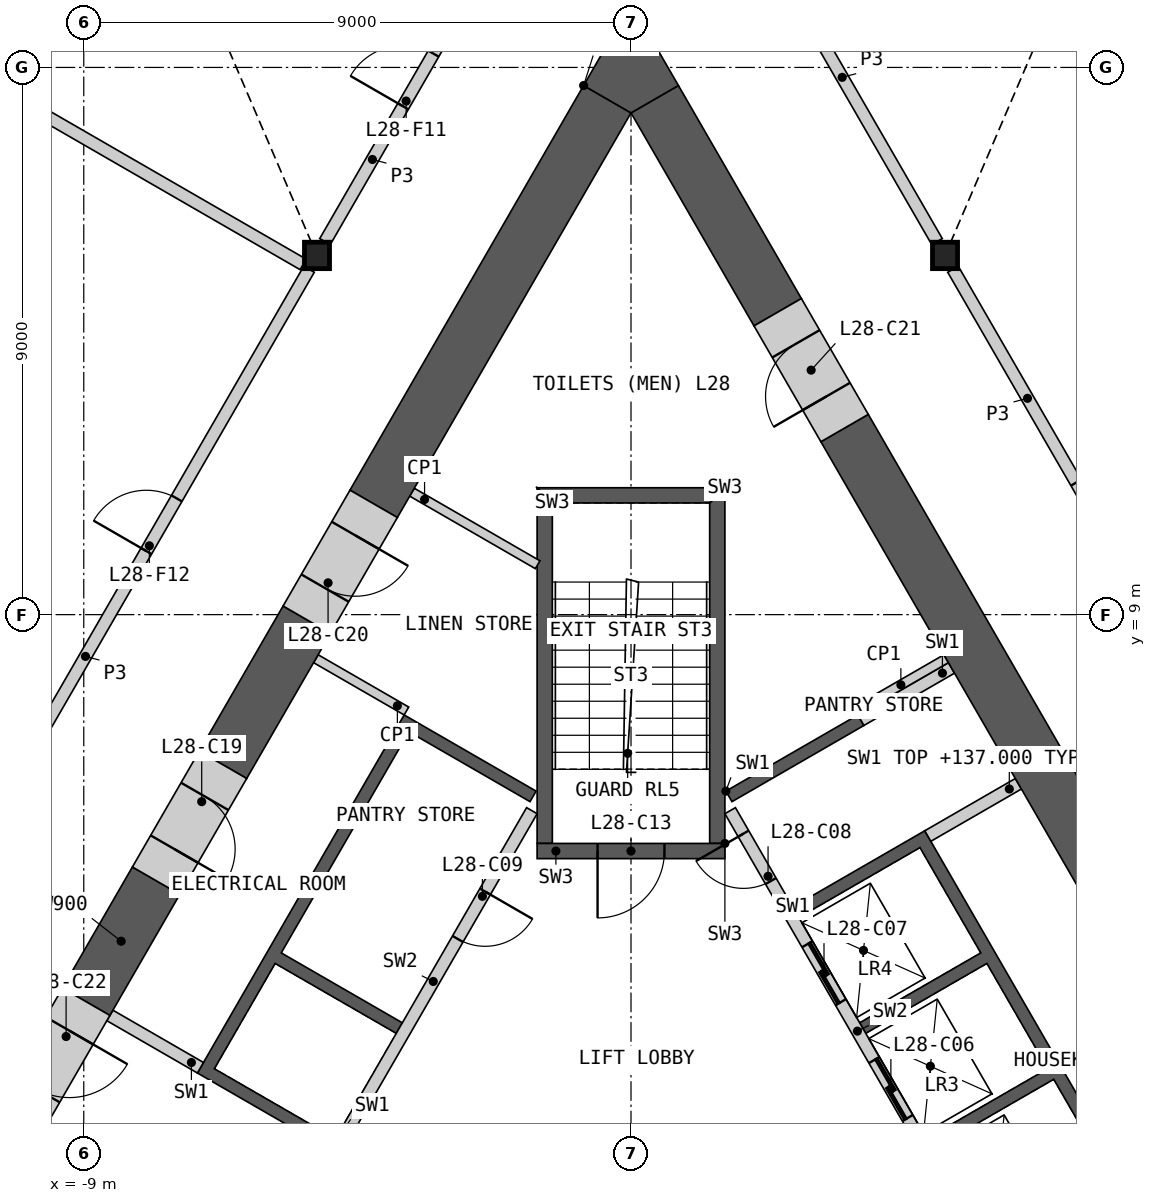
"""IFC4 building model, lengths in metres.
Left out: names, types, materials, properties, quantities, classifications, styles, units other than length and angle.
Written with IfcOpenShell. Run it as: python <this file> out.ifc"""

import sys

from ifc_helpers import new_model, si_unit, direction, frame, frame_2d, origin, origin_2d, place, context, subcontext, project, spatial, polyline, rectangle, i_section, outline, extrude, element, fill, save


model = new_model("IFC4")
c1 = context("Model", 3, precision=1e-05, world=origin(), true_north=direction((0.0, 1.0)))
c2 = subcontext(c1, "Body", "Model", "MODEL_VIEW")
j1 = project(units=[si_unit("LENGTHUNIT", "METRE"), si_unit("PLANEANGLEUNIT", "RADIAN")], contexts=[c1])
p1 = place(None, origin())
s1 = spatial("IfcSite", under=j1, at=p1, CompositionType="ELEMENT")
p2 = place(p1, origin())
s2 = spatial("IfcBuilding", under=s1, at=p2, CompositionType="ELEMENT")
p3 = place(p2, frame((0.0, 0.0, 133.2)))
s3 = spatial("IfcBuildingStorey", under=s2, at=p3, CompositionType="ELEMENT", Elevation=133.2)
for number, where, z_axis, x_axis in (
    (1, (-5.164, 14.908, 0.0), (0.0, 0.0, 1.0), (1.0, 0.0, 0.0)),
    (2, (5.164, 14.908, 0.0), (0.0, 0.0, 1.0), (1.0, 0.0, 0.0)),
):
    element("IfcColumn", number, at=place(p3, frame(where, z_axis=z_axis, x_axis=x_axis)), inside=s3, PredefinedType="COLUMN", context=c2, shape_type="SweptSolid", body=[
        extrude(i_section(OverallWidth=0.412, OverallDepth=0.435, WebThickness=0.036, FlangeThickness=0.057, at=origin_2d()), origin(), (0.0, 0.0, 1.0), 4.2),
    ])
p4 = place(p3, origin())
e3 = element("IfcWall", 3, at=p4, inside=s3, PredefinedType="SHEAR", context=c2, shape_type="SweptSolid", body=[
    extrude(outline(polyline([(1.561, 6.097), (3.731, 7.35), (3.831, 7.177), (1.66, 5.924), (1.561, 6.097)])), origin(), (0.0, 0.0, 1.0), 3.8),
])
p5 = place(p3, origin())
e4 = element("IfcWall", 4, at=p5, inside=s3, PredefinedType="SHEAR", context=c2, shape_type="SweptSolid", body=[
    extrude(outline(polyline([(2.66, 4.192), (4.831, 5.445), (8.231, -0.444), (6.061, -1.697), (5.96, -1.524), (7.952, -0.374), (6.952, 1.358), (4.96, 0.208), (4.861, 0.381), (6.852, 1.531), (5.852, 3.263), (3.861, 2.113), (3.76, 2.287), (5.752, 3.437), (4.752, 5.169), (2.76, 4.019), (2.66, 4.192)])), origin(), (0.0, 0.0, 1.0), 3.8),
])
p6 = place(p3, frame((5.817, -1.476, 0.0), z_axis=(0.0, 0.0, 1.0), x_axis=(-0.500002616675, 0.866023893041, 0.0)))
e5 = element("IfcWall", 5, at=p6, inside=s3, PredefinedType="SOLIDWALL", context=c2, shape_type="SweptSolid", body=[
    extrude(rectangle(XDim=8.373, YDim=0.2, at=frame_2d((4.187, 0.0))), origin(), (0.0, 0.0, 1.0), 3.8),
])
p7 = place(p6, frame((0.337, 0.0, 0.0)))
e6 = element("IfcOpeningElement", 6, at=p7, cuts=e5, PredefinedType="OPENING", context=c2, shape_type="SweptSolid", body=[
    extrude(rectangle(XDim=1.1, YDim=2.1, at=frame_2d((0.55, 1.05))), frame((0.0, 0.11, 0.0), z_axis=(0.0, -1.0, 0.0), x_axis=(1.0, 0.0, 0.0)), (0.0, 0.0, 1.0), 0.22),
])
p8 = place(p6, frame((2.537, 0.0, 0.0)))
e7 = element("IfcOpeningElement", 7, at=p8, cuts=e5, PredefinedType="OPENING", context=c2, shape_type="SweptSolid", body=[
    extrude(rectangle(XDim=1.1, YDim=2.1, at=frame_2d((0.55, 1.05))), frame((0.0, 0.11, 0.0), z_axis=(0.0, -1.0, 0.0), x_axis=(1.0, 0.0, 0.0)), (0.0, 0.0, 1.0), 0.22),
])
p9 = place(p6, frame((4.737, 0.0, 0.0)))
e8 = element("IfcOpeningElement", 8, at=p9, cuts=e5, PredefinedType="OPENING", context=c2, shape_type="SweptSolid", body=[
    extrude(rectangle(XDim=1.1, YDim=2.1, at=frame_2d((0.55, 1.05))), frame((0.0, 0.11, 0.0), z_axis=(0.0, -1.0, 0.0), x_axis=(1.0, 0.0, 0.0)), (0.0, 0.0, 1.0), 0.22),
])
p10 = place(p6, frame((7.037, 0.0, 0.0)))
e9 = element("IfcOpeningElement", 9, at=p10, cuts=e5, PredefinedType="OPENING", context=c2, shape_type="SweptSolid", body=[
    extrude(rectangle(XDim=0.9, YDim=2.1, at=frame_2d((0.45, 1.05))), frame((0.0, 0.11, 0.0), z_axis=(0.0, -1.0, 0.0), x_axis=(1.0, 0.0, 0.0)), (0.0, 0.0, 1.0), 0.22),
])
for number, where, z_axis, x_axis in (
    (10, (4.881, 5.358, 0.0), (0.0, 0.0, 1.0), (0.866, 0.5, 0.0)),
    (11, (3.781, 7.263, 0.0), (0.0, 0.0, 1.0), (0.866, 0.5, 0.0)),
):
    element("IfcWall", number, at=place(p3, frame(where, z_axis=z_axis, x_axis=x_axis)), inside=s3, PredefinedType="SHEAR", context=c2, shape_type="SweptSolid", body=[
        extrude(rectangle(XDim=1.72, YDim=0.2, at=frame_2d((0.86, 0.0))), origin(), (0.0, 0.0, 1.0), 3.8),
    ])
p11 = place(p3, origin())
e12 = element("IfcWall", 12, at=p11, inside=s3, PredefinedType="SHEAR", context=c2, shape_type="SweptSolid", body=[
    extrude(outline(polyline([(-4.96, 0.208), (-7.131, 1.461), (-3.731, 7.35), (-1.561, 6.097), (-1.66, 5.924), (-3.652, 7.074), (-5.752, 3.437), (-3.76, 2.287), (-3.861, 2.113), (-5.852, 3.263), (-6.852, 1.531), (-4.861, 0.381), (-4.96, 0.208)])), origin(), (0.0, 0.0, 1.0), 3.8),
])
p12 = place(p3, frame((-1.631, 5.776, 0.0), z_axis=(0.0, 0.0, 1.0), x_axis=(-0.499992876559, -0.866029516466, 0.0)))
e13 = element("IfcWall", 13, at=p12, inside=s3, PredefinedType="SOLIDWALL", context=c2, shape_type="SweptSolid", body=[
    extrude(rectangle(XDim=6.486, YDim=0.2, at=frame_2d((3.243, 0.0))), origin(), (0.0, 0.0, 1.0), 3.8),
])
p13 = place(p12, frame((1.537, 0.0, 0.0)))
e14 = element("IfcOpeningElement", 14, at=p13, cuts=e13, PredefinedType="OPENING", context=c2, shape_type="SweptSolid", body=[
    extrude(rectangle(XDim=0.9, YDim=2.1, at=frame_2d((0.45, 1.05))), frame((0.0, 0.11, 0.0), z_axis=(0.0, -1.0, 0.0), x_axis=(1.0, 0.0, 0.0)), (0.0, 0.0, 1.0), 0.22),
])
p14 = place(p3, frame((-7.081, 1.548, 0.0), z_axis=(0.0, 0.0, 1.0), x_axis=(-0.865963414263, 0.500107353632, 0.0)))
e15 = element("IfcWall", 15, at=p14, inside=s3, PredefinedType="SHEAR", context=c2, shape_type="SweptSolid", body=[
    extrude(rectangle(XDim=1.72, YDim=0.2, at=frame_2d((0.86, 0.0))), origin(), (0.0, 0.0, 1.0), 3.8),
])
p15 = place(p3, origin())
e16 = element("IfcWall", 16, at=p15, inside=s3, PredefinedType="SHEAR", context=c2, shape_type="SweptSolid", body=[
    extrude(outline(polyline([(1.544, 5.237), (1.544, 11.087), (1.294, 10.837), (1.294, 5.237), (1.544, 5.237)])), origin(), (0.0, 0.0, 1.0), 3.8),
])
p16 = place(p3, origin())
e17 = element("IfcWall", 17, at=p16, inside=s3, PredefinedType="SHEAR", context=c2, shape_type="SweptSolid", body=[
    extrude(outline(polyline([(1.544, 11.087), (-1.544, 11.087), (-1.294, 10.837), (1.294, 10.837), (1.544, 11.087)])), origin(), (0.0, 0.0, 1.0), 3.8),
])
p17 = place(p3, origin())
e18 = element("IfcWall", 18, at=p17, inside=s3, PredefinedType="SHEAR", context=c2, shape_type="SweptSolid", body=[
    extrude(outline(polyline([(-1.294, 10.837), (-1.544, 11.087), (-1.544, 5.237), (-1.294, 5.237), (-1.294, 10.837)])), origin(), (0.0, 0.0, 1.0), 3.8),
])
p18 = place(p3, frame((1.544, 5.112, 0.0), z_axis=(0.0, 0.0, 1.0), x_axis=(-1.0, 0.0, 0.0)))
e19 = element("IfcWall", 19, at=p18, inside=s3, PredefinedType="SHEAR", context=c2, shape_type="SweptSolid", body=[
    extrude(rectangle(XDim=3.088, YDim=0.25, at=frame_2d((1.544, 0.0))), origin(), (0.0, 0.0, 1.0), 3.8),
])
p19 = place(p18, frame((0.994, 0.0, 0.0)))
e20 = element("IfcOpeningElement", 20, at=p19, cuts=e19, PredefinedType="OPENING", context=c2, shape_type="SweptSolid", body=[
    extrude(rectangle(XDim=1.1, YDim=2.1, at=frame_2d((0.55, 1.05))), frame((0.0, 0.135, 0.0), z_axis=(0.0, -1.0, 0.0), x_axis=(1.0, 0.0, 0.0)), (0.0, 0.0, 1.0), 0.27),
])
for number, where, z_axis, x_axis in (
    (21, (3.693, 7.415, 0.0), (0.0, 0.0, 1.0), (0.866, 0.5, 0.0)),
    (22, (-3.693, 7.415, 0.0), (0.0, 0.0, 1.0), (-0.866, 0.5, 0.0)),
):
    element("IfcWall", number, at=place(p3, frame(where, z_axis=z_axis, x_axis=x_axis)), inside=s3, PredefinedType="PARTITIONING", context=c2, shape_type="SweptSolid", body=[
        extrude(rectangle(XDim=1.72, YDim=0.15, at=frame_2d((0.86, 0.0))), origin(), (0.0, 0.0, 1.0), 3.8),
    ])
p20 = place(p3, frame((-3.602, 11.014, 0.0), z_axis=(0.0, 0.0, 1.0), x_axis=(0.866011787705, -0.500023583, 0.0)))
e23 = element("IfcWall", 23, at=p20, inside=s3, PredefinedType="PARTITIONING", context=c2, shape_type="SweptSolid", body=[
    extrude(rectangle(XDim=2.386, YDim=0.15, at=frame_2d((1.193, 0.0))), origin(), (0.0, 0.0, 1.0), 3.8),
])
p21 = place(p3, frame((7.91, 4.451, 0.0), z_axis=(0.0, 0.0, 1.0), x_axis=(-0.500001962043, 0.866024270995, 0.0)))
e24 = element("IfcWall", 24, at=p21, inside=s3, PredefinedType="SHEAR", context=c2, shape_type="SweptSolid", body=[
    extrude(rectangle(XDim=8.796, YDim=0.9, at=frame_2d((4.398, 0.0))), origin(), (0.0, 0.0, 1.0), 3.8),
])
p22 = place(p3, frame((2.413, 13.974, 0.0), z_axis=(0.0, 0.0, 1.0), x_axis=(-0.500046330384, 0.865998653272, 0.0)))
e25 = element("IfcWall", 25, at=p22, inside=s3, PredefinedType="SHEAR", context=c2, shape_type="SweptSolid", body=[
    extrude(rectangle(XDim=4.045, YDim=0.9, at=frame_2d((2.023, 0.0))), origin(), (0.0, 0.0, 1.0), 3.8),
])
p23 = place(p3, frame((-0.39, 17.478, 0.0), z_axis=(0.0, 0.0, 1.0), x_axis=(-0.500010285023, -0.866019465642, 0.0)))
e26 = element("IfcWall", 26, at=p23, inside=s3, PredefinedType="SHEAR", context=c2, shape_type="SweptSolid", body=[
    extrude(rectangle(XDim=7.685, YDim=0.9, at=frame_2d((3.842, 0.0))), origin(), (0.0, 0.0, 1.0), 3.8),
])
p24 = place(p3, frame((-5.332, 8.917, 0.0), z_axis=(0.0, 0.0, 1.0), x_axis=(-0.499949934511, -0.866054307178, 0.0)))
e27 = element("IfcWall", 27, at=p24, inside=s3, PredefinedType="SHEAR", context=c2, shape_type="SweptSolid", body=[
    extrude(rectangle(XDim=2.756, YDim=0.9, at=frame_2d((1.378, 0.0))), origin(), (0.0, 0.0, 1.0), 3.8),
])
p25 = place(p3, frame((-7.81, 4.625, 0.0), z_axis=(0.0, 0.0, 1.0), x_axis=(-0.499952165731, -0.866053019151, 0.0)))
e28 = element("IfcWall", 28, at=p25, inside=s3, PredefinedType="SHEAR", context=c2, shape_type="SweptSolid", body=[
    extrude(rectangle(XDim=2.3, YDim=0.9, at=frame_2d((1.15, 0.0))), origin(), (0.0, 0.0, 1.0), 3.8),
])
p26 = place(p3, origin())
e29 = element("IfcWall", 29, at=p26, inside=s3, PredefinedType="SHEAR", context=c2, shape_type="SweptSolid", body=[
    extrude(outline(polyline([(-0.779, 17.703), (0.0, 19.052), (0.779, 17.703), (0.0, 17.253), (-0.779, 17.703)])), origin(), (0.0, 0.0, 1.0), 3.8),
])
p27 = place(p3, frame((-6.71, 6.53, 0.0), z_axis=(0.0, 0.0, 1.0), x_axis=(-0.50002983664, -0.866008176907, 0.0)))
e30 = element("IfcWall", 30, at=p27, inside=s3, PredefinedType="SHEAR", context=c2, shape_type="SweptSolid", body=[
    extrude(rectangle(XDim=2.2, YDim=0.9, at=frame_2d((1.1, 0.0))), origin(), (0.0, 0.0, 1.0), 3.8),
])
p28 = place(p27, frame((0.6, 0.0, 0.0)))
e31 = element("IfcOpeningElement", 31, at=p28, cuts=e30, PredefinedType="OPENING", context=c2, shape_type="SweptSolid", body=[
    extrude(rectangle(XDim=1.0, YDim=2.1, at=frame_2d((0.5, 1.05))), frame((0.0, 0.46, 0.0), z_axis=(0.0, -1.0, 0.0), x_axis=(1.0, 0.0, 0.0)), (0.0, 0.0, 1.0), 0.92),
])
p29 = place(p3, frame((-4.232, 10.822, 0.0), z_axis=(0.0, 0.0, 1.0), x_axis=(-0.50002983664, -0.866008176907, 0.0)))
e32 = element("IfcWall", 32, at=p29, inside=s3, PredefinedType="SHEAR", context=c2, shape_type="SweptSolid", body=[
    extrude(rectangle(XDim=2.2, YDim=0.9, at=frame_2d((1.1, 0.0))), origin(), (0.0, 0.0, 1.0), 3.8),
])
p30 = place(p29, frame((0.6, 0.0, 0.0)))
e33 = element("IfcOpeningElement", 33, at=p30, cuts=e32, PredefinedType="OPENING", context=c2, shape_type="SweptSolid", body=[
    extrude(rectangle(XDim=1.0, YDim=2.1, at=frame_2d((0.5, 1.05))), frame((0.0, 0.46, 0.0), z_axis=(0.0, -1.0, 0.0), x_axis=(1.0, 0.0, 0.0)), (0.0, 0.0, 1.0), 0.92),
])
p31 = place(p3, frame((3.512, 12.069, 0.0), z_axis=(0.0, 0.0, 1.0), x_axis=(-0.499946605688, 0.86605622881, 0.0)))
e34 = element("IfcWall", 34, at=p31, inside=s3, PredefinedType="SHEAR", context=c2, shape_type="SweptSolid", body=[
    extrude(rectangle(XDim=2.2, YDim=0.9, at=frame_2d((1.1, 0.0))), origin(), (0.0, 0.0, 1.0), 3.8),
])
p32 = place(p31, frame((0.6, 0.0, 0.0)))
e35 = element("IfcOpeningElement", 35, at=p32, cuts=e34, PredefinedType="OPENING", context=c2, shape_type="SweptSolid", body=[
    extrude(rectangle(XDim=1.0, YDim=2.1, at=frame_2d((0.5, 1.05))), frame((0.0, 0.46, 0.0), z_axis=(0.0, -1.0, 0.0), x_axis=(1.0, 0.0, 0.0)), (0.0, 0.0, 1.0), 0.92),
])
p33 = place(p3, frame((-8.96, 2.633, 0.0), z_axis=(0.0, 0.0, 1.0), x_axis=(-0.50002983664, -0.866008176907, 0.0)))
e36 = element("IfcWall", 36, at=p33, inside=s3, PredefinedType="SHEAR", context=c2, shape_type="SweptSolid", body=[
    extrude(rectangle(XDim=2.2, YDim=0.9, at=frame_2d((1.1, 0.0))), origin(), (0.0, 0.0, 1.0), 3.8),
])
p34 = place(p33, frame((0.55, 0.0, 0.0)))
e37 = element("IfcOpeningElement", 37, at=p34, cuts=e36, PredefinedType="OPENING", context=c2, shape_type="SweptSolid", body=[
    extrude(rectangle(XDim=1.1, YDim=2.1, at=frame_2d((0.55, 1.05))), frame((0.0, 0.46, 0.0), z_axis=(0.0, -1.0, 0.0), x_axis=(1.0, 0.0, 0.0)), (0.0, 0.0, 1.0), 0.92),
])
p35 = place(p3, frame((5.295, 14.68, 0.0), z_axis=(0.0, 0.0, 1.0), x_axis=(0.500012035596, -0.866018454918, 0.0)))
e38 = element("IfcWall", 38, at=p35, inside=s3, PredefinedType="PARTITIONING", context=c2, shape_type="SweptSolid", body=[
    extrude(rectangle(XDim=9.803, YDim=0.2, at=frame_2d((4.902, 0.0))), origin(), (0.0, 0.0, 1.0), 3.8),
])
p36 = place(p35, frame((4.052, 0.0, 0.0)))
e39 = element("IfcOpeningElement", 39, at=p36, cuts=e38, PredefinedType="OPENING", context=c2, shape_type="SweptSolid", body=[
    extrude(rectangle(XDim=1.8, YDim=2.1, at=frame_2d((0.9, 1.05))), frame((0.0, 0.11, 0.0), z_axis=(0.0, -1.0, 0.0), x_axis=(1.0, 0.0, 0.0)), (0.0, 0.0, 1.0), 0.22),
])
p37 = place(p3, frame((-10.197, 6.19, 0.0), z_axis=(0.0, 0.0, 1.0), x_axis=(0.500012035596, 0.866018454918, 0.0)))
e40 = element("IfcWall", 40, at=p37, inside=s3, PredefinedType="PARTITIONING", context=c2, shape_type="SweptSolid", body=[
    extrude(rectangle(XDim=9.803, YDim=0.2, at=frame_2d((4.902, 0.0))), origin(), (0.0, 0.0, 1.0), 3.8),
])
p38 = place(p37, frame((4.452, 0.0, 0.0)))
e41 = element("IfcOpeningElement", 41, at=p38, cuts=e40, PredefinedType="OPENING", context=c2, shape_type="SweptSolid", body=[
    extrude(rectangle(XDim=1.0, YDim=2.1, at=frame_2d((0.5, 1.05))), frame((0.0, 0.11, 0.0), z_axis=(0.0, -1.0, 0.0), x_axis=(1.0, 0.0, 0.0)), (0.0, 0.0, 1.0), 0.22),
])
p39 = place(p3, frame((-5.033, 15.135, 0.0), z_axis=(0.0, 0.0, 1.0), x_axis=(0.499980978912, 0.866036385336, 0.0)))
e42 = element("IfcWall", 42, at=p39, inside=s3, PredefinedType="PARTITIONING", context=c2, shape_type="SweptSolid", body=[
    extrude(rectangle(XDim=6.24, YDim=0.2, at=frame_2d((3.12, 0.0))), origin(), (0.0, 0.0, 1.0), 3.8),
])
p40 = place(p39, frame((2.57, 0.0, 0.0)))
e43 = element("IfcOpeningElement", 43, at=p40, cuts=e42, PredefinedType="OPENING", context=c2, shape_type="SweptSolid", body=[
    extrude(rectangle(XDim=1.0, YDim=2.1, at=frame_2d((0.5, 1.05))), frame((0.0, 0.11, 0.0), z_axis=(0.0, -1.0, 0.0), x_axis=(1.0, 0.0, 0.0)), (0.0, 0.0, 1.0), 0.22),
])
p41 = place(p3, frame((1.913, 20.539, 0.0), z_axis=(0.0, 0.0, 1.0), x_axis=(0.499980978912, -0.866036385336, 0.0)))
e44 = element("IfcWall", 44, at=p41, inside=s3, PredefinedType="PARTITIONING", context=c2, shape_type="SweptSolid", body=[
    extrude(rectangle(XDim=6.24, YDim=0.2, at=frame_2d((3.12, 0.0))), origin(), (0.0, 0.0, 1.0), 3.8),
])
p42 = place(p3, frame((-16.436, 21.137, 0.0), z_axis=(0.0, 0.0, 1.0), x_axis=(0.866023321739, -0.500003606191, 0.0)))
e45 = element("IfcWall", 45, at=p42, inside=s3, PredefinedType="PARTITIONING", context=c2, shape_type="SweptSolid", body=[
    extrude(rectangle(XDim=12.753, YDim=0.2, at=frame_2d((6.377, 0.0))), origin(), (0.0, 0.0, 1.0), 2.885),
])
p43 = place(p8, origin())
e46 = element("IfcDoor", 46, at=p43, inside=s3, OperationType="SLIDING_TO_LEFT", PredefinedType="DOOR", context=c2, shape_type="SweptSolid", body=[
    extrude(rectangle(XDim=1.1, YDim=2.1, at=frame_2d((0.55, 1.05))), frame((0.0, 0.025, 0.0), z_axis=(0.0, -1.0, 0.0), x_axis=(1.0, 0.0, 0.0)), (0.0, 0.0, 1.0), 0.05),
])
fill(e7, e46)
p44 = place(p9, origin())
e47 = element("IfcDoor", 47, at=p44, inside=s3, OperationType="SLIDING_TO_LEFT", PredefinedType="DOOR", context=c2, shape_type="SweptSolid", body=[
    extrude(rectangle(XDim=1.1, YDim=2.1, at=frame_2d((0.55, 1.05))), frame((0.0, 0.025, 0.0), z_axis=(0.0, -1.0, 0.0), x_axis=(1.0, 0.0, 0.0)), (0.0, 0.0, 1.0), 0.05),
])
fill(e8, e47)
p45 = place(p10, origin())
e48 = element("IfcDoor", 48, at=p45, inside=s3, OperationType="SINGLE_SWING_RIGHT", PredefinedType="DOOR", context=c2, shape_type="SweptSolid", body=[
    extrude(rectangle(XDim=0.9, YDim=2.1, at=frame_2d((0.45, 1.05))), frame((0.0, 0.025, 0.0), z_axis=(0.0, -1.0, 0.0), x_axis=(1.0, 0.0, 0.0)), (0.0, 0.0, 1.0), 0.05),
])
fill(e9, e48)
p46 = place(p13, origin())
e49 = element("IfcDoor", 49, at=p46, inside=s3, OperationType="SINGLE_SWING_LEFT", PredefinedType="DOOR", context=c2, shape_type="SweptSolid", body=[
    extrude(rectangle(XDim=0.9, YDim=2.1, at=frame_2d((0.45, 1.05))), frame((0.0, 0.025, 0.0), z_axis=(0.0, -1.0, 0.0), x_axis=(1.0, 0.0, 0.0)), (0.0, 0.0, 1.0), 0.05),
])
fill(e14, e49)
p47 = place(p19, origin())
e50 = element("IfcDoor", 50, at=p47, inside=s3, OperationType="SINGLE_SWING_RIGHT", PredefinedType="DOOR", context=c2, shape_type="SweptSolid", body=[
    extrude(rectangle(XDim=1.1, YDim=2.1, at=frame_2d((0.55, 1.05))), frame((0.0, 0.025, 0.0), z_axis=(0.0, -1.0, 0.0), x_axis=(1.0, 0.0, 0.0)), (0.0, 0.0, 1.0), 0.05),
])
fill(e20, e50)
p48 = place(p28, origin())
e51 = element("IfcDoor", 51, at=p48, inside=s3, OperationType="SINGLE_SWING_RIGHT", PredefinedType="DOOR", context=c2, shape_type="SweptSolid", body=[
    extrude(rectangle(XDim=1.0, YDim=2.1, at=frame_2d((0.5, 1.05))), frame((0.0, 0.205, 0.0), z_axis=(0.0, -1.0, 0.0), x_axis=(1.0, 0.0, 0.0)), (0.0, 0.0, 1.0), 0.05),
])
fill(e31, e51)
p49 = place(p30, origin())
e52 = element("IfcDoor", 52, at=p49, inside=s3, OperationType="SINGLE_SWING_LEFT", PredefinedType="DOOR", context=c2, shape_type="SweptSolid", body=[
    extrude(rectangle(XDim=1.0, YDim=2.1, at=frame_2d((0.5, 1.05))), frame((0.0, 0.205, 0.0), z_axis=(0.0, -1.0, 0.0), x_axis=(1.0, 0.0, 0.0)), (0.0, 0.0, 1.0), 0.05),
])
fill(e33, e52)
p50 = place(p32, origin())
e53 = element("IfcDoor", 53, at=p50, inside=s3, OperationType="SINGLE_SWING_LEFT", PredefinedType="DOOR", context=c2, shape_type="SweptSolid", body=[
    extrude(rectangle(XDim=1.0, YDim=2.1, at=frame_2d((0.5, 1.05))), frame((0.0, 0.205, 0.0), z_axis=(0.0, -1.0, 0.0), x_axis=(1.0, 0.0, 0.0)), (0.0, 0.0, 1.0), 0.05),
])
fill(e35, e53)
p51 = place(p34, origin())
e54 = element("IfcDoor", 54, at=p51, inside=s3, OperationType="SINGLE_SWING_LEFT", PredefinedType="DOOR", context=c2, shape_type="SweptSolid", body=[
    extrude(rectangle(XDim=1.1, YDim=2.1, at=frame_2d((0.55, 1.05))), frame((0.0, 0.205, 0.0), z_axis=(0.0, -1.0, 0.0), x_axis=(1.0, 0.0, 0.0)), (0.0, 0.0, 1.0), 0.05),
])
fill(e37, e54)
p52 = place(p36, origin())
e55 = element("IfcDoor", 55, at=p52, inside=s3, OperationType="DOUBLE_DOOR_SINGLE_SWING", PredefinedType="DOOR", context=c2, shape_type="SweptSolid", body=[
    extrude(rectangle(XDim=1.8, YDim=2.1, at=frame_2d((0.9, 1.05))), frame((0.0, 0.025, 0.0), z_axis=(0.0, -1.0, 0.0), x_axis=(1.0, 0.0, 0.0)), (0.0, 0.0, 1.0), 0.05),
])
fill(e39, e55)
p53 = place(p40, origin())
e56 = element("IfcDoor", 56, at=p53, inside=s3, OperationType="SINGLE_SWING_LEFT", PredefinedType="DOOR", context=c2, shape_type="SweptSolid", body=[
    extrude(rectangle(XDim=1.0, YDim=2.1, at=frame_2d((0.5, 1.05))), frame((0.0, 0.025, 0.0), z_axis=(0.0, -1.0, 0.0), x_axis=(1.0, 0.0, 0.0)), (0.0, 0.0, 1.0), 0.05),
])
fill(e43, e56)
p54 = place(p38, origin())
e57 = element("IfcDoor", 57, at=p54, inside=s3, OperationType="SINGLE_SWING_LEFT", PredefinedType="DOOR", context=c2, shape_type="SweptSolid", body=[
    extrude(rectangle(XDim=1.0, YDim=2.1, at=frame_2d((0.5, 1.05))), frame((0.0, 0.025, 0.0), z_axis=(0.0, -1.0, 0.0), x_axis=(1.0, 0.0, 0.0)), (0.0, 0.0, 1.0), 0.05),
])
fill(e41, e57)
save(model, sys.argv[1])
